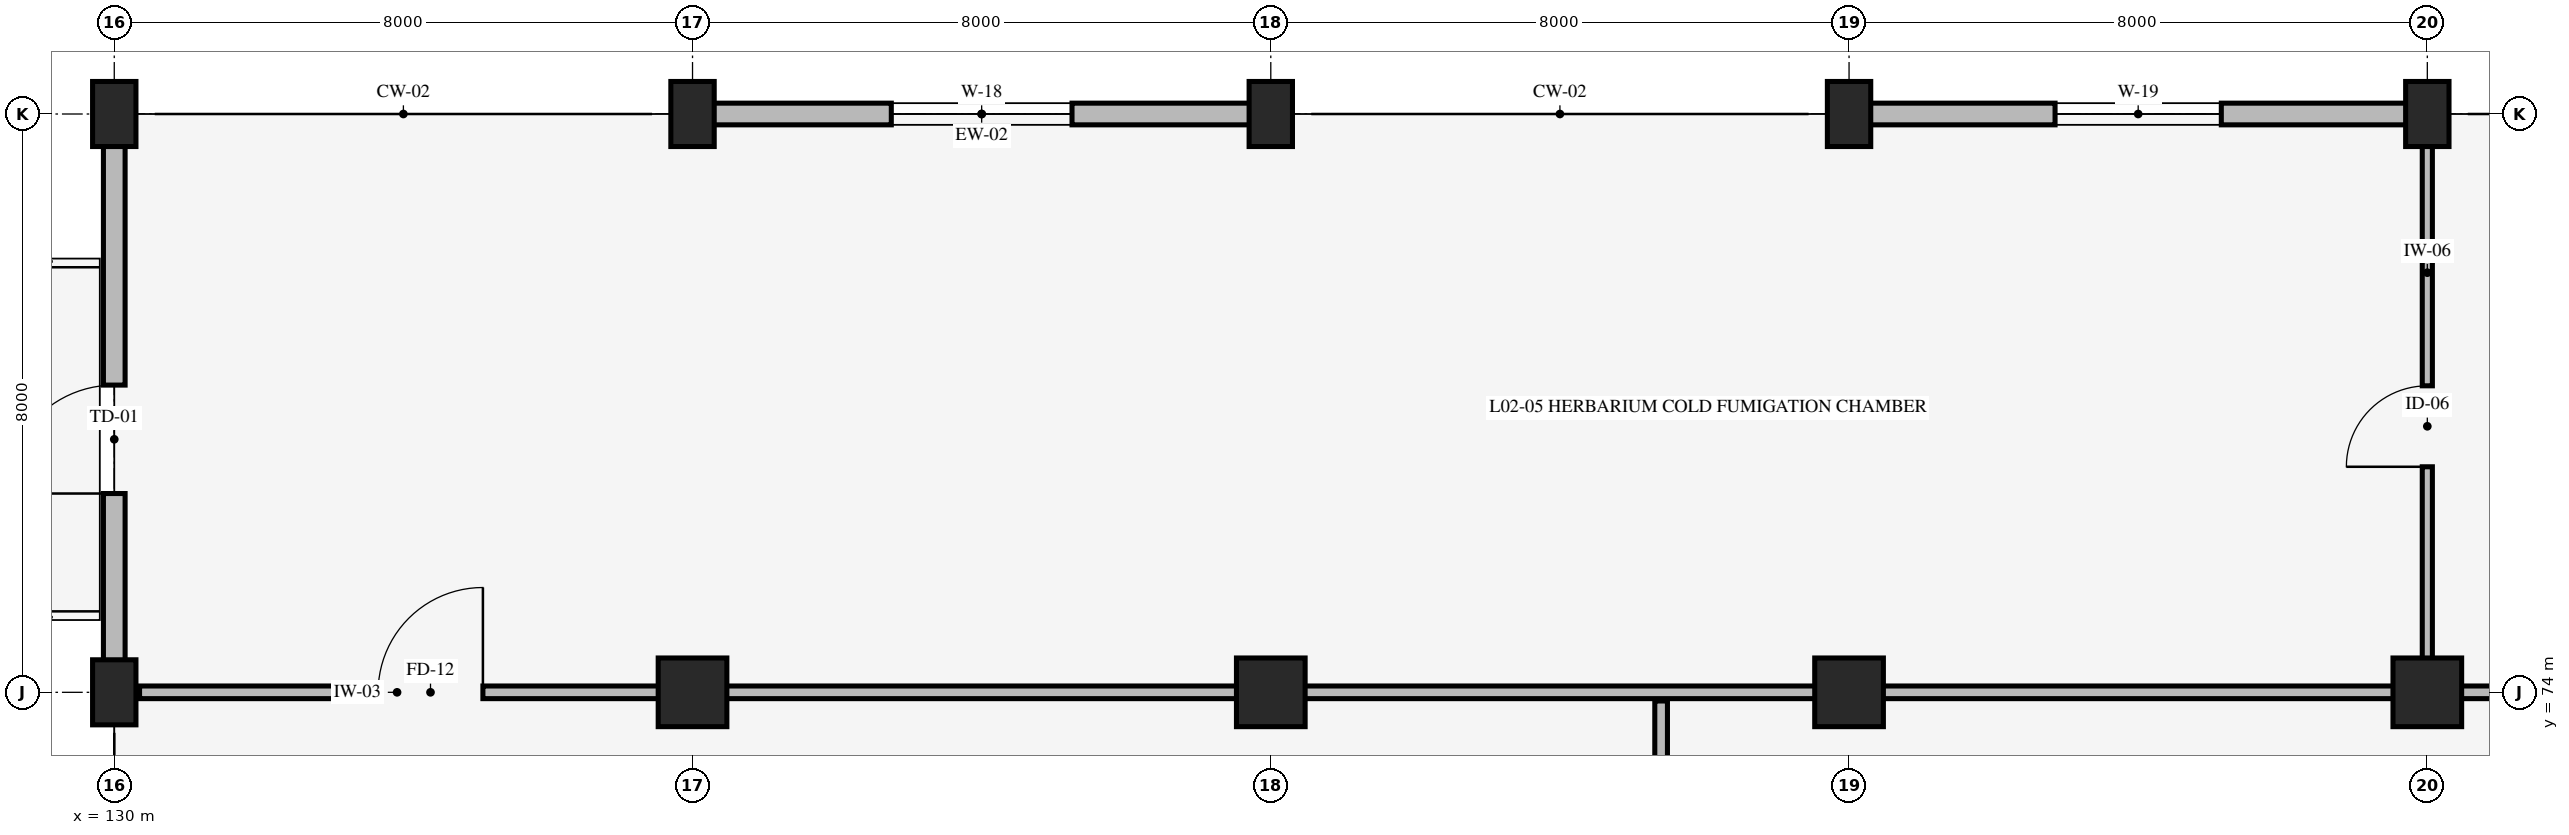
"""IFC4 building model, lengths in metres.
Left out: names, types, materials, properties, quantities, classifications, styles, units other than length and angle.
Written with IfcOpenShell. Run it as: python <this file> out.ifc"""

import sys

from ifc_helpers import new_model, si_unit, direction, frame, frame_2d, origin, origin_2d, place, context, subcontext, project, spatial, rectangle, extrude, element, fill, save


model = new_model("IFC4")
c1 = context("Model", 3, precision=1e-05, world=origin(), true_north=direction((0.0, 1.0)))
c2 = subcontext(c1, "Body", "Model", "MODEL_VIEW")
j1 = project(units=[si_unit("LENGTHUNIT", "METRE"), si_unit("PLANEANGLEUNIT", "RADIAN")], contexts=[c1])
p1 = place(None, origin())
s1 = spatial("IfcSite", under=j1, at=p1, CompositionType="ELEMENT")
p2 = place(p1, origin())
s2 = spatial("IfcBuilding", under=s1, at=p2, CompositionType="ELEMENT")
p3 = place(p2, frame((0.0, 0.0, 5.4)))
s3 = spatial("IfcBuildingStorey", under=s2, at=p3, CompositionType="ELEMENT", Elevation=5.4)
for number, where, z_axis, x_axis in (
    (1, (130.0, 74.0, 0.0), (0.0, 0.0, 1.0), (1.0, 0.0, 0.0)),
    (2, (130.0, 82.0, 0.0), (0.0, 0.0, 1.0), (1.0, 0.0, 0.0)),
):
    element("IfcColumn", number, at=place(p3, frame(where, z_axis=z_axis, x_axis=x_axis)), inside=s3, PredefinedType="COLUMN", context=c2, shape_type="SweptSolid", body=[
        extrude(rectangle(XDim=0.6, YDim=0.9, at=origin_2d()), origin(), (0.0, 0.0, 1.0), 4.8),
    ])
p4 = place(p3, frame((138.0, 74.0, 0.0), z_axis=(0.0, 0.0, 1.0), x_axis=(1.0, 0.0, 0.0)))
e3 = element("IfcColumn", 3, at=p4, inside=s3, PredefinedType="COLUMN", context=c2, shape_type="SweptSolid", body=[
    extrude(rectangle(XDim=0.95, YDim=0.95, at=origin_2d()), origin(), (0.0, 0.0, 1.0), 4.8),
])
p5 = place(p3, frame((138.0, 82.0, 0.0), z_axis=(0.0, 0.0, 1.0), x_axis=(1.0, 0.0, 0.0)))
e4 = element("IfcColumn", 4, at=p5, inside=s3, PredefinedType="COLUMN", context=c2, shape_type="SweptSolid", body=[
    extrude(rectangle(XDim=0.6, YDim=0.9, at=origin_2d()), origin(), (0.0, 0.0, 1.0), 4.8),
])
p6 = place(p3, frame((146.0, 74.0, 0.0), z_axis=(0.0, 0.0, 1.0), x_axis=(1.0, 0.0, 0.0)))
e5 = element("IfcColumn", 5, at=p6, inside=s3, PredefinedType="COLUMN", context=c2, shape_type="SweptSolid", body=[
    extrude(rectangle(XDim=0.95, YDim=0.95, at=origin_2d()), origin(), (0.0, 0.0, 1.0), 4.8),
])
p7 = place(p3, frame((146.0, 82.0, 0.0), z_axis=(0.0, 0.0, 1.0), x_axis=(1.0, 0.0, 0.0)))
e6 = element("IfcColumn", 6, at=p7, inside=s3, PredefinedType="COLUMN", context=c2, shape_type="SweptSolid", body=[
    extrude(rectangle(XDim=0.6, YDim=0.9, at=origin_2d()), origin(), (0.0, 0.0, 1.0), 4.8),
])
p8 = place(p3, frame((154.0, 74.0, 0.0), z_axis=(0.0, 0.0, 1.0), x_axis=(1.0, 0.0, 0.0)))
e7 = element("IfcColumn", 7, at=p8, inside=s3, PredefinedType="COLUMN", context=c2, shape_type="SweptSolid", body=[
    extrude(rectangle(XDim=0.95, YDim=0.95, at=origin_2d()), origin(), (0.0, 0.0, 1.0), 4.8),
])
p9 = place(p3, frame((154.0, 82.0, 0.0), z_axis=(0.0, 0.0, 1.0), x_axis=(1.0, 0.0, 0.0)))
e8 = element("IfcColumn", 8, at=p9, inside=s3, PredefinedType="COLUMN", context=c2, shape_type="SweptSolid", body=[
    extrude(rectangle(XDim=0.6, YDim=0.9, at=origin_2d()), origin(), (0.0, 0.0, 1.0), 4.8),
])
p10 = place(p3, frame((162.0, 74.0, 0.0), z_axis=(0.0, 0.0, 1.0), x_axis=(1.0, 0.0, 0.0)))
e9 = element("IfcColumn", 9, at=p10, inside=s3, PredefinedType="COLUMN", context=c2, shape_type="SweptSolid", body=[
    extrude(rectangle(XDim=0.95, YDim=0.95, at=origin_2d()), origin(), (0.0, 0.0, 1.0), 4.8),
])
p11 = place(p3, frame((162.0, 82.0, 0.0), z_axis=(0.0, 0.0, 1.0), x_axis=(1.0, 0.0, 0.0)))
e10 = element("IfcColumn", 10, at=p11, inside=s3, PredefinedType="COLUMN", context=c2, shape_type="SweptSolid", body=[
    extrude(rectangle(XDim=0.6, YDim=0.9, at=origin_2d()), origin(), (0.0, 0.0, 1.0), 4.8),
])
p12 = place(p3, frame((130.0, 74.0, 0.0), z_axis=(0.0, 0.0, 1.0), x_axis=(0.0, 1.0, 0.0)))
e11 = element("IfcWall", 11, at=p12, inside=s3, PredefinedType="STANDARD", context=c2, shape_type="SweptSolid", body=[
    extrude(rectangle(XDim=8.0, YDim=0.3, at=frame_2d((4.0, 0.0))), origin(), (0.0, 0.0, 1.0), 3.55),
])
p13 = place(p12, frame((2.75, 0.0, 0.0)))
e12 = element("IfcOpeningElement", 12, at=p13, cuts=e11, PredefinedType="OPENING", context=c2, shape_type="SweptSolid", body=[
    extrude(rectangle(XDim=1.5, YDim=2.25, at=frame_2d((0.75, 1.125))), frame((0.0, 0.16, 0.0), z_axis=(0.0, -1.0, 0.0), x_axis=(1.0, 0.0, 0.0)), (0.0, 0.0, 1.0), 0.32),
])
p14 = place(p3, frame((138.0, 82.0, 0.0), z_axis=(0.0, 0.0, 1.0), x_axis=(1.0, 0.0, 0.0)))
e13 = element("IfcWall", 13, at=p14, inside=s3, PredefinedType="STANDARD", context=c2, shape_type="SweptSolid", body=[
    extrude(rectangle(XDim=8.0, YDim=0.3, at=frame_2d((4.0, 0.0))), origin(), (0.0, 0.0, 1.0), 3.6),
])
p15 = place(p14, frame((2.75, 0.0, 0.85)))
e14 = element("IfcOpeningElement", 14, at=p15, cuts=e13, PredefinedType="OPENING", context=c2, shape_type="SweptSolid", body=[
    extrude(rectangle(XDim=2.5, YDim=1.8, at=frame_2d((1.25, 0.9))), frame((0.0, 0.16, 0.0), z_axis=(0.0, -1.0, 0.0), x_axis=(1.0, 0.0, 0.0)), (0.0, 0.0, 1.0), 0.32),
])
p16 = place(p3, frame((154.0, 82.0, 0.0), z_axis=(0.0, 0.0, 1.0), x_axis=(1.0, 0.0, 0.0)))
e15 = element("IfcWall", 15, at=p16, inside=s3, PredefinedType="STANDARD", context=c2, shape_type="SweptSolid", body=[
    extrude(rectangle(XDim=8.0, YDim=0.3, at=frame_2d((4.0, 0.0))), origin(), (0.0, 0.0, 1.0), 3.6),
])
p17 = place(p16, frame((2.85, 0.0, 0.85)))
e16 = element("IfcOpeningElement", 16, at=p17, cuts=e15, PredefinedType="OPENING", context=c2, shape_type="SweptSolid", body=[
    extrude(rectangle(XDim=2.3, YDim=1.5, at=frame_2d((1.15, 0.75))), frame((0.0, 0.16, 0.0), z_axis=(0.0, -1.0, 0.0), x_axis=(1.0, 0.0, 0.0)), (0.0, 0.0, 1.0), 0.32),
])
p18 = place(p3, frame((151.4, 54.12, 0.0), z_axis=(0.0, 0.0, 1.0), x_axis=(0.0, 1.0, 0.0)))
e17 = element("IfcWall", 17, at=p18, inside=s3, PredefinedType="STANDARD", context=c2, shape_type="SweptSolid", body=[
    extrude(rectangle(XDim=19.76, YDim=0.175, at=frame_2d((9.88, 0.0))), origin(), (0.0, 0.0, 1.0), 4.5),
])
p19 = place(p18, frame((9.33, 0.0, 0.0)))
e18 = element("IfcOpeningElement", 18, at=p19, cuts=e17, PredefinedType="OPENING", context=c2, shape_type="SweptSolid", body=[
    extrude(rectangle(XDim=1.1, YDim=2.1, at=frame_2d((0.55, 1.05))), frame((0.0, 0.098, 0.0), z_axis=(0.0, -1.0, 0.0), x_axis=(1.0, 0.0, 0.0)), (0.0, 0.0, 1.0), 0.195),
])
p20 = place(p3, frame((130.35, 74.0, 0.0), z_axis=(0.0, 0.0, 1.0), x_axis=(1.0, 0.0, 0.0)))
e19 = element("IfcWall", 19, at=p20, inside=s3, PredefinedType="STANDARD", context=c2, shape_type="SweptSolid", body=[
    extrude(rectangle(XDim=31.3, YDim=0.175, at=frame_2d((15.65, 0.0))), origin(), (0.0, 0.0, 1.0), 3.6),
])
p21 = place(p20, frame((3.3, 0.0, 0.0)))
e20 = element("IfcOpeningElement", 20, at=p21, cuts=e19, PredefinedType="OPENING", context=c2, shape_type="SweptSolid", body=[
    extrude(rectangle(XDim=1.45, YDim=2.2, at=frame_2d((0.725, 1.1))), frame((0.0, 0.098, 0.0), z_axis=(0.0, -1.0, 0.0), x_axis=(1.0, 0.0, 0.0)), (0.0, 0.0, 1.0), 0.195),
])
p22 = place(p3, frame((162.0, 74.12, 0.0), z_axis=(0.0, 0.0, 1.0), x_axis=(0.0, 1.0, 0.0)))
e21 = element("IfcWall", 21, at=p22, inside=s3, PredefinedType="STANDARD", context=c2, shape_type="SweptSolid", body=[
    extrude(rectangle(XDim=7.83, YDim=0.14, at=frame_2d((3.915, 0.0))), origin(), (0.0, 0.0, 1.0), 3.55),
])
p23 = place(p22, frame((3.0, 0.0, 0.0)))
e22 = element("IfcOpeningElement", 22, at=p23, cuts=e21, PredefinedType="OPENING", context=c2, shape_type="SweptSolid", body=[
    extrude(rectangle(XDim=1.12, YDim=2.12, at=frame_2d((0.56, 1.06))), frame((0.0, 0.08, 0.0), z_axis=(0.0, -1.0, 0.0), x_axis=(1.0, 0.0, 0.0)), (0.0, 0.0, 1.0), 0.16),
])
p24 = place(p3, frame((162.35, 74.0, 0.0), z_axis=(0.0, 0.0, 1.0), x_axis=(1.0, 0.0, 0.0)))
e23 = element("IfcWall", 23, at=p24, inside=s3, PredefinedType="STANDARD", context=c2, shape_type="SweptSolid", body=[
    extrude(rectangle(XDim=14.7, YDim=0.175, at=frame_2d((7.35, 0.0))), origin(), (0.0, 0.0, 1.0), 3.6),
])
p25 = place(p24, frame((1.05, 0.0, 0.0)))
e24 = element("IfcOpeningElement", 24, at=p25, cuts=e23, PredefinedType="OPENING", context=c2, shape_type="SweptSolid", body=[
    extrude(rectangle(XDim=0.9, YDim=2.1, at=frame_2d((0.45, 1.05))), frame((0.0, 0.098, 0.0), z_axis=(0.0, -1.0, 0.0), x_axis=(1.0, 0.0, 0.0)), (0.0, 0.0, 1.0), 0.195),
])
p26 = place(p13, origin())
e25 = element("IfcDoor", 25, at=p26, inside=s3, OperationType="SINGLE_SWING_LEFT", PredefinedType="DOOR", context=c2, shape_type="SweptSolid", body=[
    extrude(rectangle(XDim=1.5, YDim=2.25, at=frame_2d((0.75, 1.125))), frame((0.0, 0.025, 0.0), z_axis=(0.0, -1.0, 0.0), x_axis=(1.0, 0.0, 0.0)), (0.0, 0.0, 1.0), 0.05),
])
fill(e12, e25)
p27 = place(p15, origin())
e26 = element("IfcWindow", 26, at=p27, inside=s3, PartitioningType="SINGLE_PANEL", PredefinedType="WINDOW", context=c2, shape_type="SweptSolid", body=[
    extrude(rectangle(XDim=2.5, YDim=1.8, at=frame_2d((1.25, 0.9))), frame((0.0, 0.03, 0.0), z_axis=(0.0, -1.0, 0.0), x_axis=(1.0, 0.0, 0.0)), (0.0, 0.0, 1.0), 0.06),
])
fill(e14, e26)
p28 = place(p17, origin())
e27 = element("IfcWindow", 27, at=p28, inside=s3, PartitioningType="SINGLE_PANEL", PredefinedType="WINDOW", context=c2, shape_type="SweptSolid", body=[
    extrude(rectangle(XDim=2.3, YDim=1.5, at=frame_2d((1.15, 0.75))), frame((0.0, 0.03, 0.0), z_axis=(0.0, -1.0, 0.0), x_axis=(1.0, 0.0, 0.0)), (0.0, 0.0, 1.0), 0.06),
])
fill(e16, e27)
p29 = place(p21, origin())
e28 = element("IfcDoor", 28, at=p29, inside=s3, OperationType="SINGLE_SWING_RIGHT", PredefinedType="DOOR", context=c2, shape_type="SweptSolid", body=[
    extrude(rectangle(XDim=1.45, YDim=2.2, at=frame_2d((0.725, 1.1))), frame((0.0, 0.025, 0.0), z_axis=(0.0, -1.0, 0.0), x_axis=(1.0, 0.0, 0.0)), (0.0, 0.0, 1.0), 0.05),
])
fill(e20, e28)
p30 = place(p23, origin())
e29 = element("IfcDoor", 29, at=p30, inside=s3, OperationType="SINGLE_SWING_LEFT", PredefinedType="DOOR", context=c2, shape_type="SweptSolid", body=[
    extrude(rectangle(XDim=1.12, YDim=2.12, at=frame_2d((0.56, 1.06))), frame((0.0, 0.025, 0.0), z_axis=(0.0, -1.0, 0.0), x_axis=(1.0, 0.0, 0.0)), (0.0, 0.0, 1.0), 0.05),
])
fill(e22, e29)
save(model, sys.argv[1])
